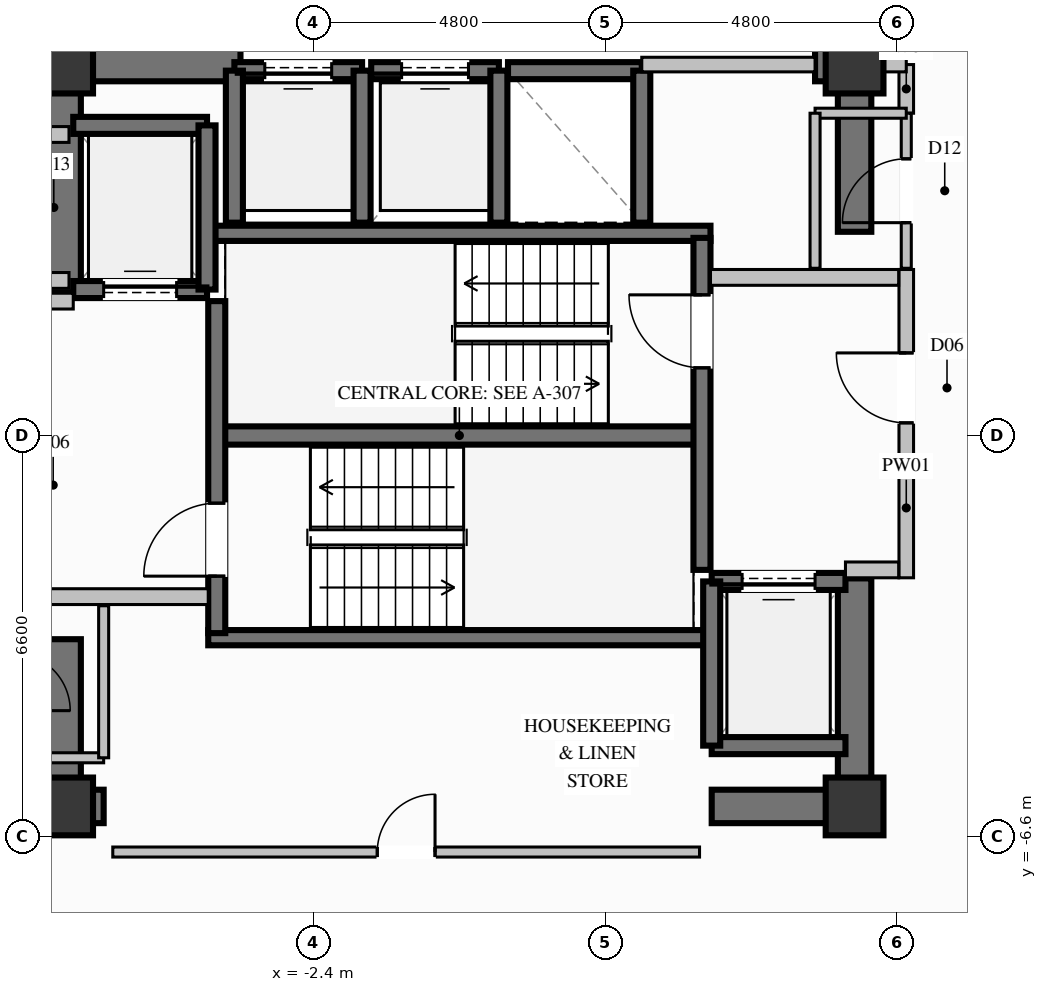
"""IFC4 building model, lengths in metres.
Left out: names, types, materials, properties, quantities, classifications, styles, units other than length and angle.
Written with IfcOpenShell. Run it as: python <this file> out.ifc"""

import sys

from ifc_helpers import new_model, si_unit, direction, frame, frame_2d, origin, origin_2d, place, context, subcontext, project, spatial, rectangle, extrude, element, fill, save


model = new_model("IFC4")
c1 = context("Model", 3, precision=1e-05, world=origin(), true_north=direction((0.0, 1.0)))
c2 = subcontext(c1, "Body", "Model", "MODEL_VIEW")
j1 = project(units=[si_unit("LENGTHUNIT", "METRE"), si_unit("PLANEANGLEUNIT", "RADIAN")], contexts=[c1])
p1 = place(None, origin())
s1 = spatial("IfcSite", under=j1, at=p1, CompositionType="ELEMENT")
p2 = place(p1, origin())
s2 = spatial("IfcBuilding", under=s1, at=p2, CompositionType="ELEMENT")
p3 = place(p2, frame((0.0, 0.0, 180.4)))
s3 = spatial("IfcBuildingStorey", under=s2, at=p3, CompositionType="ELEMENT", Elevation=180.4)
for number, where, z_axis, x_axis in (
    (1, (-6.5, -6.1, 0.0), (0.0, 0.0, 1.0), (1.0, 0.0, 0.0)),
    (2, (6.5, -6.1, 0.0), (0.0, 0.0, 1.0), (1.0, 0.0, 0.0)),
    (3, (6.5, 6.1, 0.0), (0.0, 0.0, 1.0), (1.0, 0.0, 0.0)),
    (4, (-6.5, 6.1, 0.0), (0.0, 0.0, 1.0), (1.0, 0.0, 0.0)),
):
    element("IfcColumn", number, at=place(p3, frame(where, z_axis=z_axis, x_axis=x_axis)), inside=s3, PredefinedType="COLUMN", context=c2, shape_type="SweptSolid", body=[
        extrude(rectangle(XDim=0.95, YDim=0.95, at=origin_2d()), origin(), (0.0, 0.0, 1.0), 3.6),
    ])
p4 = place(p3, frame((-3.99, 0.0, 0.0), z_axis=(0.0, 0.0, 1.0), x_axis=(1.0, 0.0, 0.0)))
e5 = element("IfcWall", 5, at=p4, inside=s3, PredefinedType="SHEAR", context=c2, shape_type="SweptSolid", body=[
    extrude(rectangle(XDim=7.98, YDim=0.3, at=frame_2d((3.99, 0.0))), origin(), (0.0, 0.0, 1.0), 3.6),
])
for number, where, z_axis, x_axis in (
    (6, (-4.13, -3.325, 0.0), (0.0, 0.0, 1.0), (1.0, 0.0, 0.0)),
    (7, (-4.13, 3.325, 0.0), (0.0, 0.0, 1.0), (1.0, 0.0, 0.0)),
):
    element("IfcWall", number, at=place(p3, frame(where, z_axis=z_axis, x_axis=x_axis)), inside=s3, PredefinedType="SOLIDWALL", context=c2, shape_type="SweptSolid", body=[
        extrude(rectangle(XDim=8.26, YDim=0.25, at=frame_2d((4.13, 0.0))), origin(), (0.0, 0.0, 1.0), 3.6),
    ])
p5 = place(p3, frame((-6.225, -6.1, 0.0), z_axis=(0.0, 0.0, 1.0), x_axis=(1.0, 0.0, 0.0)))
e8 = element("IfcWall", 8, at=p5, inside=s3, PredefinedType="SHEAR", context=c2, shape_type="SweptSolid", body=[
    extrude(rectangle(XDim=0.375, YDim=0.55, at=frame_2d((0.188, 0.0))), origin(), (0.0, 0.0, 1.0), 3.6),
])
p6 = place(p3, frame((4.15, -6.1, 0.0), z_axis=(0.0, 0.0, 1.0), x_axis=(1.0, 0.0, 0.0)))
e9 = element("IfcWall", 9, at=p6, inside=s3, PredefinedType="SHEAR", context=c2, shape_type="SweptSolid", body=[
    extrude(rectangle(XDim=2.075, YDim=0.55, at=frame_2d((1.038, 0.0))), origin(), (0.0, 0.0, 1.0), 3.6),
])
p7 = place(p3, frame((-6.225, 6.1, 0.0), z_axis=(0.0, 0.0, 1.0), x_axis=(1.0, 0.0, 0.0)))
e10 = element("IfcWall", 10, at=p7, inside=s3, PredefinedType="SHEAR", context=c2, shape_type="SweptSolid", body=[
    extrude(rectangle(XDim=2.625, YDim=0.55, at=frame_2d((1.312, 0.0))), origin(), (0.0, 0.0, 1.0), 3.6),
])
p8 = place(p3, frame((5.85, 6.1, 0.0), z_axis=(0.0, 0.0, 1.0), x_axis=(1.0, 0.0, 0.0)))
e11 = element("IfcWall", 11, at=p8, inside=s3, PredefinedType="SHEAR", context=c2, shape_type="SweptSolid", body=[
    extrude(rectangle(XDim=0.375, YDim=0.55, at=frame_2d((0.188, 0.0))), origin(), (0.0, 0.0, 1.0), 3.6),
])
p9 = place(p3, frame((-6.5, 2.35, 0.0), z_axis=(0.0, 0.0, 1.0), x_axis=(0.0, 1.0, 0.0)))
e12 = element("IfcWall", 12, at=p9, inside=s3, PredefinedType="SHEAR", context=c2, shape_type="SweptSolid", body=[
    extrude(rectangle(XDim=4.025, YDim=0.55, at=frame_2d((2.012, 0.0))), origin(), (0.0, 0.0, 1.0), 3.6),
])
p10 = place(p3, frame((-6.5, -6.375, 0.0), z_axis=(0.0, 0.0, 1.0), x_axis=(0.0, 1.0, 0.0)))
e13 = element("IfcWall", 13, at=p10, inside=s3, PredefinedType="SHEAR", context=c2, shape_type="SweptSolid", body=[
    extrude(rectangle(XDim=3.025, YDim=0.55, at=frame_2d((1.512, 0.0))), origin(), (0.0, 0.0, 1.0), 3.6),
])
p11 = place(p3, frame((6.5, -6.375, 0.0), z_axis=(0.0, 0.0, 1.0), x_axis=(0.0, 1.0, 0.0)))
e14 = element("IfcWall", 14, at=p11, inside=s3, PredefinedType="SHEAR", context=c2, shape_type="SweptSolid", body=[
    extrude(rectangle(XDim=4.025, YDim=0.55, at=frame_2d((2.012, 0.0))), origin(), (0.0, 0.0, 1.0), 3.6),
])
p12 = place(p3, frame((6.5, 3.35, 0.0), z_axis=(0.0, 0.0, 1.0), x_axis=(0.0, 1.0, 0.0)))
e15 = element("IfcWall", 15, at=p12, inside=s3, PredefinedType="SHEAR", context=c2, shape_type="SweptSolid", body=[
    extrude(rectangle(XDim=3.025, YDim=0.55, at=frame_2d((1.512, 0.0))), origin(), (0.0, 0.0, 1.0), 3.6),
])
p13 = place(p3, frame((-1.6, 6.0, 0.0), z_axis=(0.0, 0.0, 1.0), x_axis=(-1.0, 0.0, 0.0)))
e16 = element("IfcWall", 16, at=p13, inside=s3, PredefinedType="SOLIDWALL", context=c2, shape_type="SweptSolid", body=[
    extrude(rectangle(XDim=2.1, YDim=0.28, at=frame_2d((1.05, 0.0))), origin(), (0.0, 0.0, 1.0), 3.36),
])
p14 = place(p13, frame((0.5, 0.0, 0.0)))
e17 = element("IfcOpeningElement", 17, at=p14, cuts=e16, PredefinedType="OPENING", context=c2, shape_type="SweptSolid", body=[
    extrude(rectangle(XDim=1.1, YDim=2.2, at=frame_2d((0.55, 1.1))), frame((0.0, 0.15, 0.0), z_axis=(0.0, -1.0, 0.0), x_axis=(1.0, 0.0, 0.0)), (0.0, 0.0, 1.0), 0.3),
])
for number, where, z_axis, x_axis in (
    (18, (-3.7, 6.0, 0.0), (0.0, 0.0, 1.0), (0.0, -1.0, 0.0)),
    (19, (-1.6, 3.5, 0.0), (0.0, 0.0, 1.0), (0.0, 1.0, 0.0)),
):
    element("IfcWall", number, at=place(p3, frame(where, z_axis=z_axis, x_axis=x_axis)), inside=s3, PredefinedType="SOLIDWALL", context=c2, shape_type="SweptSolid", body=[
        extrude(rectangle(XDim=2.5, YDim=0.28, at=frame_2d((1.25, 0.0))), origin(), (0.0, 0.0, 1.0), 3.36),
    ])
p15 = place(p3, frame((0.65, 6.0, 0.0), z_axis=(0.0, 0.0, 1.0), x_axis=(-1.0, 0.0, 0.0)))
e20 = element("IfcWall", 20, at=p15, inside=s3, PredefinedType="SOLIDWALL", context=c2, shape_type="SweptSolid", body=[
    extrude(rectangle(XDim=2.1, YDim=0.28, at=frame_2d((1.05, 0.0))), origin(), (0.0, 0.0, 1.0), 3.36),
])
p16 = place(p15, frame((0.5, 0.0, 0.0)))
e21 = element("IfcOpeningElement", 21, at=p16, cuts=e20, PredefinedType="OPENING", context=c2, shape_type="SweptSolid", body=[
    extrude(rectangle(XDim=1.1, YDim=2.2, at=frame_2d((0.55, 1.1))), frame((0.0, 0.15, 0.0), z_axis=(0.0, -1.0, 0.0), x_axis=(1.0, 0.0, 0.0)), (0.0, 0.0, 1.0), 0.3),
])
p17 = place(p3, frame((0.65, 3.5, 0.0), z_axis=(0.0, 0.0, 1.0), x_axis=(0.0, 1.0, 0.0)))
e22 = element("IfcWall", 22, at=p17, inside=s3, PredefinedType="SOLIDWALL", context=c2, shape_type="SweptSolid", body=[
    extrude(rectangle(XDim=2.5, YDim=0.28, at=frame_2d((1.25, 0.0))), origin(), (0.0, 0.0, 1.0), 3.36),
])
p18 = place(p3, frame((3.0, 6.0, 0.0), z_axis=(0.0, 0.0, 1.0), x_axis=(-1.0, 0.0, 0.0)))
e23 = element("IfcWall", 23, at=p18, inside=s3, PredefinedType="SOLIDWALL", context=c2, shape_type="SweptSolid", body=[
    extrude(rectangle(XDim=2.2, YDim=0.28, at=frame_2d((1.1, 0.0))), origin(), (0.0, 0.0, 1.0), 3.36),
])
p19 = place(p3, frame((3.0, 3.5, 0.0), z_axis=(0.0, 0.0, 1.0), x_axis=(0.0, 1.0, 0.0)))
e24 = element("IfcWall", 24, at=p19, inside=s3, PredefinedType="SOLIDWALL", context=c2, shape_type="SweptSolid", body=[
    extrude(rectangle(XDim=2.5, YDim=0.28, at=frame_2d((1.25, 0.0))), origin(), (0.0, 0.0, 1.0), 3.36),
])
p20 = place(p3, frame((-6.35, 2.4, 0.0), z_axis=(0.0, 0.0, 1.0), x_axis=(1.0, 0.0, 0.0)))
e25 = element("IfcWall", 25, at=p20, inside=s3, PredefinedType="SOLIDWALL", context=c2, shape_type="SweptSolid", body=[
    extrude(rectangle(XDim=2.2, YDim=0.28, at=frame_2d((1.1, 0.0))), origin(), (0.0, 0.0, 1.0), 3.36),
])
p21 = place(p20, frame((0.5, 0.0, 0.0)))
e26 = element("IfcOpeningElement", 26, at=p21, cuts=e25, PredefinedType="OPENING", context=c2, shape_type="SweptSolid", body=[
    extrude(rectangle(XDim=1.2, YDim=2.2, at=frame_2d((0.6, 1.1))), frame((0.0, 0.15, 0.0), z_axis=(0.0, -1.0, 0.0), x_axis=(1.0, 0.0, 0.0)), (0.0, 0.0, 1.0), 0.3),
])
p22 = place(p3, frame((-4.15, 5.1, 0.0), z_axis=(0.0, 0.0, 1.0), x_axis=(-1.0, 0.0, 0.0)))
e27 = element("IfcWall", 27, at=p22, inside=s3, PredefinedType="SOLIDWALL", context=c2, shape_type="SweptSolid", body=[
    extrude(rectangle(XDim=2.2, YDim=0.28, at=frame_2d((1.1, 0.0))), origin(), (0.0, 0.0, 1.0), 3.36),
])
p23 = place(p3, frame((-4.15, 2.4, 0.0), z_axis=(0.0, 0.0, 1.0), x_axis=(0.0, 1.0, 0.0)))
e28 = element("IfcWall", 28, at=p23, inside=s3, PredefinedType="SOLIDWALL", context=c2, shape_type="SweptSolid", body=[
    extrude(rectangle(XDim=2.7, YDim=0.28, at=frame_2d((1.35, 0.0))), origin(), (0.0, 0.0, 1.0), 3.36),
])
p24 = place(p3, frame((4.15, -5.1, 0.0), z_axis=(0.0, 0.0, 1.0), x_axis=(1.0, 0.0, 0.0)))
e29 = element("IfcWall", 29, at=p24, inside=s3, PredefinedType="SOLIDWALL", context=c2, shape_type="SweptSolid", body=[
    extrude(rectangle(XDim=2.2, YDim=0.28, at=frame_2d((1.1, 0.0))), origin(), (0.0, 0.0, 1.0), 3.36),
])
p25 = place(p3, frame((6.35, -2.4, 0.0), z_axis=(0.0, 0.0, 1.0), x_axis=(-1.0, 0.0, 0.0)))
e30 = element("IfcWall", 30, at=p25, inside=s3, PredefinedType="SOLIDWALL", context=c2, shape_type="SweptSolid", body=[
    extrude(rectangle(XDim=2.2, YDim=0.28, at=frame_2d((1.1, 0.0))), origin(), (0.0, 0.0, 1.0), 3.36),
])
p26 = place(p25, frame((0.5, 0.0, 0.0)))
e31 = element("IfcOpeningElement", 31, at=p26, cuts=e30, PredefinedType="OPENING", context=c2, shape_type="SweptSolid", body=[
    extrude(rectangle(XDim=1.2, YDim=2.2, at=frame_2d((0.6, 1.1))), frame((0.0, 0.15, 0.0), z_axis=(0.0, -1.0, 0.0), x_axis=(1.0, 0.0, 0.0)), (0.0, 0.0, 1.0), 0.3),
])
p27 = place(p3, frame((4.15, -2.4, 0.0), z_axis=(0.0, 0.0, 1.0), x_axis=(0.0, -1.0, 0.0)))
e32 = element("IfcWall", 32, at=p27, inside=s3, PredefinedType="SOLIDWALL", context=c2, shape_type="SweptSolid", body=[
    extrude(rectangle(XDim=2.7, YDim=0.28, at=frame_2d((1.35, 0.0))), origin(), (0.0, 0.0, 1.0), 3.36),
])
p28 = place(p3, frame((-3.99, -3.25, 0.0), z_axis=(0.0, 0.0, 1.0), x_axis=(0.0, 1.0, 0.0)))
e33 = element("IfcWall", 33, at=p28, inside=s3, PredefinedType="SOLIDWALL", context=c2, shape_type="SweptSolid", body=[
    extrude(rectangle(XDim=5.46, YDim=0.28, at=frame_2d((2.73, 0.0))), origin(), (0.0, 0.0, 1.0), 3.36),
])
p29 = place(p28, frame((0.937, 0.0, 0.0)))
e34 = element("IfcOpeningElement", 34, at=p29, cuts=e33, PredefinedType="OPENING", context=c2, shape_type="SweptSolid", body=[
    extrude(rectangle(XDim=1.2, YDim=2.2, at=frame_2d((0.6, 1.1))), frame((0.0, 0.15, 0.0), z_axis=(0.0, -1.0, 0.0), x_axis=(1.0, 0.0, 0.0)), (0.0, 0.0, 1.0), 0.3),
])
p30 = place(p3, frame((3.99, -2.21, 0.0), z_axis=(0.0, 0.0, 1.0), x_axis=(0.0, 1.0, 0.0)))
e35 = element("IfcWall", 35, at=p30, inside=s3, PredefinedType="SOLIDWALL", context=c2, shape_type="SweptSolid", body=[
    extrude(rectangle(XDim=5.46, YDim=0.28, at=frame_2d((2.73, 0.0))), origin(), (0.0, 0.0, 1.0), 3.36),
])
p31 = place(p30, frame((3.323, 0.0, 0.0)))
e36 = element("IfcOpeningElement", 36, at=p31, cuts=e35, PredefinedType="OPENING", context=c2, shape_type="SweptSolid", body=[
    extrude(rectangle(XDim=1.2, YDim=2.2, at=frame_2d((0.6, 1.1))), frame((0.0, 0.15, 0.0), z_axis=(0.0, -1.0, 0.0), x_axis=(1.0, 0.0, 0.0)), (0.0, 0.0, 1.0), 0.3),
])
p32 = place(p3, frame((-7.225, -2.65, 0.0), z_axis=(0.0, 0.0, 1.0), x_axis=(1.0, 0.0, 0.0)))
e37 = element("IfcWall", 37, at=p32, inside=s3, PredefinedType="PARTITIONING", context=c2, shape_type="SweptSolid", body=[
    extrude(rectangle(XDim=3.095, YDim=0.26, at=frame_2d((1.548, 0.0))), origin(), (0.0, 0.0, 1.0), 3.36),
])
p33 = place(p3, frame((-7.225, 2.21, 0.0), z_axis=(0.0, 0.0, 1.0), x_axis=(1.0, 0.0, 0.0)))
e38 = element("IfcWall", 38, at=p33, inside=s3, PredefinedType="PARTITIONING", context=c2, shape_type="SweptSolid", body=[
    extrude(rectangle(XDim=0.875, YDim=0.26, at=frame_2d((0.438, 0.0))), origin(), (0.0, 0.0, 1.0), 3.36),
])
p34 = place(p3, frame((7.35, -2.34, 0.0), z_axis=(0.0, 0.0, 1.0), x_axis=(0.0, 1.0, 0.0)))
e39 = element("IfcWall", 39, at=p34, inside=s3, PredefinedType="PARTITIONING", context=c2, shape_type="SweptSolid", body=[
    extrude(rectangle(XDim=5.07, YDim=0.24, at=frame_2d((2.535, 0.0))), origin(), (0.0, 0.0, 1.0), 2.445),
])
p35 = place(p34, frame((2.548, 0.0, 0.0)))
e40 = element("IfcOpeningElement", 40, at=p35, cuts=e39, PredefinedType="OPENING", context=c2, shape_type="SweptSolid", body=[
    extrude(rectangle(XDim=1.15, YDim=2.2, at=frame_2d((0.575, 1.1))), frame((0.0, 0.13, 0.0), z_axis=(0.0, -1.0, 0.0), x_axis=(1.0, 0.0, 0.0)), (0.0, 0.0, 1.0), 0.26),
])
p36 = place(p3, frame((6.35, -2.21, 0.0), z_axis=(0.0, 0.0, 1.0), x_axis=(1.0, 0.0, 0.0)))
e41 = element("IfcWall", 41, at=p36, inside=s3, PredefinedType="PARTITIONING", context=c2, shape_type="SweptSolid", body=[
    extrude(rectangle(XDim=0.875, YDim=0.26, at=frame_2d((0.438, 0.0))), origin(), (0.0, 0.0, 1.0), 3.36),
])
p37 = place(p3, frame((4.13, 2.6, 0.0), z_axis=(0.0, 0.0, 1.0), x_axis=(1.0, 0.0, 0.0)))
e42 = element("IfcWall", 42, at=p37, inside=s3, PredefinedType="PARTITIONING", context=c2, shape_type="SweptSolid", body=[
    extrude(rectangle(XDim=3.095, YDim=0.26, at=frame_2d((1.548, 0.0))), origin(), (0.0, 0.0, 1.0), 3.36),
])
for number, where, z_axis, x_axis in (
    (43, (-7.35, 4.95, 0.0), (0.0, 0.0, 1.0), (1.0, 0.0, 0.0)),
    (44, (-7.35, 2.55, 0.0), (0.0, 0.0, 1.0), (1.0, 0.0, 0.0)),
):
    element("IfcWall", number, at=place(p3, frame(where, z_axis=z_axis, x_axis=x_axis)), inside=s3, PredefinedType="PARTITIONING", context=c2, shape_type="SweptSolid", body=[
        extrude(rectangle(XDim=0.93, YDim=0.26, at=frame_2d((0.465, 0.0))), origin(), (0.0, 0.0, 1.0), 3.36),
    ])
p38 = place(p3, frame((3.0, 6.1, 0.0), z_axis=(0.0, 0.0, 1.0), x_axis=(1.0, 0.0, 0.0)))
e45 = element("IfcWall", 45, at=p38, inside=s3, PredefinedType="PARTITIONING", context=c2, shape_type="SweptSolid", body=[
    extrude(rectangle(XDim=2.85, YDim=0.24, at=frame_2d((1.425, 0.0))), origin(), (0.0, 0.0, 1.0), 2.445),
])
p39 = place(p3, frame((7.35, 5.3, 0.0), z_axis=(0.0, 0.0, 1.0), x_axis=(0.0, 1.0, 0.0)))
e46 = element("IfcWall", 46, at=p39, inside=s3, PredefinedType="PARTITIONING", context=c2, shape_type="SweptSolid", body=[
    extrude(rectangle(XDim=0.8, YDim=0.24, at=frame_2d((0.4, 0.0))), origin(), (0.0, 0.0, 1.0), 2.445),
])
for number, where, z_axis, x_axis in (
    (47, (6.5, 6.1, 0.0), (0.0, 0.0, 1.0), (1.0, 0.0, 0.0)),
    (48, (-7.35, 6.1, 0.0), (0.0, 0.0, 1.0), (1.0, 0.0, 0.0)),
):
    element("IfcWall", number, at=place(p3, frame(where, z_axis=z_axis, x_axis=x_axis)), inside=s3, PredefinedType="PARTITIONING", context=c2, shape_type="SweptSolid", body=[
        extrude(rectangle(XDim=0.85, YDim=0.24, at=frame_2d((0.425, 0.0))), origin(), (0.0, 0.0, 1.0), 2.801),
    ])
p40 = place(p3, frame((-7.35, -5.3, 0.0), z_axis=(0.0, 0.0, 1.0), x_axis=(1.0, 0.0, 0.0)))
e49 = element("IfcWall", 49, at=p40, inside=s3, PredefinedType="PARTITIONING", context=c2, shape_type="SweptSolid", body=[
    extrude(rectangle(XDim=1.5, YDim=0.165, at=frame_2d((0.75, 0.0))), origin(), (0.0, 0.0, 1.0), 2.445),
])
p41 = place(p3, frame((-5.85, -5.3, 0.0), z_axis=(0.0, 0.0, 1.0), x_axis=(0.0, 1.0, 0.0)))
e50 = element("IfcWall", 50, at=p41, inside=s3, PredefinedType="PARTITIONING", context=c2, shape_type="SweptSolid", body=[
    extrude(rectangle(XDim=2.5, YDim=0.165, at=frame_2d((1.25, 0.0))), origin(), (0.0, 0.0, 1.0), 2.445),
])
p42 = place(p3, frame((7.35, 2.75, 0.0), z_axis=(0.0, 0.0, 1.0), x_axis=(0.0, 1.0, 0.0)))
e51 = element("IfcWall", 51, at=p42, inside=s3, PredefinedType="PARTITIONING", context=c2, shape_type="SweptSolid", body=[
    extrude(rectangle(XDim=2.55, YDim=0.165, at=frame_2d((1.275, 0.0))), origin(), (0.0, 0.0, 1.0), 3.36),
])
p43 = place(p42, frame((0.75, 0.0, 0.0)))
e52 = element("IfcOpeningElement", 52, at=p43, cuts=e51, PredefinedType="OPENING", context=c2, shape_type="SweptSolid", body=[
    extrude(rectangle(XDim=1.05, YDim=2.15, at=frame_2d((0.525, 1.075))), frame((0.0, 0.093, 0.0), z_axis=(0.0, -1.0, 0.0), x_axis=(1.0, 0.0, 0.0)), (0.0, 0.0, 1.0), 0.185),
])
p44 = place(p3, frame((7.35, 5.3, 0.0), z_axis=(0.0, 0.0, 1.0), x_axis=(-1.0, 0.0, 0.0)))
e53 = element("IfcWall", 53, at=p44, inside=s3, PredefinedType="PARTITIONING", context=c2, shape_type="SweptSolid", body=[
    extrude(rectangle(XDim=1.5, YDim=0.165, at=frame_2d((0.75, 0.0))), origin(), (0.0, 0.0, 1.0), 2.445),
])
p45 = place(p3, frame((5.85, 5.3, 0.0), z_axis=(0.0, 0.0, 1.0), x_axis=(0.0, -1.0, 0.0)))
e54 = element("IfcWall", 54, at=p45, inside=s3, PredefinedType="PARTITIONING", context=c2, shape_type="SweptSolid", body=[
    extrude(rectangle(XDim=2.55, YDim=0.165, at=frame_2d((1.275, 0.0))), origin(), (0.0, 0.0, 1.0), 2.445),
])
p46 = place(p3, frame((-5.7, -6.85, 0.0), z_axis=(0.0, 0.0, 1.0), x_axis=(1.0, 0.0, 0.0)))
e55 = element("IfcWall", 55, at=p46, inside=s3, PredefinedType="PARTITIONING", context=c2, shape_type="SweptSolid", body=[
    extrude(rectangle(XDim=9.65, YDim=0.165, at=frame_2d((4.825, 0.0))), origin(), (0.0, 0.0, 1.0), 2.445),
])
p47 = place(p46, frame((4.35, 0.0, 0.0)))
e56 = element("IfcOpeningElement", 56, at=p47, cuts=e55, PredefinedType="OPENING", context=c2, shape_type="SweptSolid", body=[
    extrude(rectangle(XDim=0.95, YDim=2.1, at=frame_2d((0.475, 1.05))), frame((0.0, 0.093, 0.0), z_axis=(0.0, -1.0, 0.0), x_axis=(1.0, 0.0, 0.0)), (0.0, 0.0, 1.0), 0.185),
])
p48 = place(p3, frame((7.35, 8.65, 0.0), z_axis=(0.0, 0.0, 1.0), x_axis=(0.846409267484, -0.532532958526, 0.0)))
e57 = element("IfcWall", 57, at=p48, inside=s3, PredefinedType="PARTITIONING", context=c2, shape_type="SweptSolid", body=[
    extrude(rectangle(XDim=4.413, YDim=0.24, at=frame_2d((2.206, 0.0))), origin(), (0.0, 0.0, 1.0), 3.36),
])
p49 = place(p48, frame((1.706, 0.0, 0.0)))
e58 = element("IfcOpeningElement", 58, at=p49, cuts=e57, PredefinedType="OPENING", context=c2, shape_type="SweptSolid", body=[
    extrude(rectangle(XDim=1.0, YDim=2.2, at=frame_2d((0.5, 1.1))), frame((0.0, 0.13, 0.0), z_axis=(0.0, -1.0, 0.0), x_axis=(1.0, 0.0, 0.0)), (0.0, 0.0, 1.0), 0.26),
])
p50 = place(p14, origin())
e59 = element("IfcDoor", 59, at=p50, inside=s3, OperationType="SLIDING_TO_LEFT", PredefinedType="DOOR", context=c2, shape_type="SweptSolid", body=[
    extrude(rectangle(XDim=1.1, YDim=2.2, at=frame_2d((0.55, 1.1))), frame((0.0, 0.025, 0.0), z_axis=(0.0, -1.0, 0.0), x_axis=(1.0, 0.0, 0.0)), (0.0, 0.0, 1.0), 0.05),
])
fill(e17, e59)
p51 = place(p16, origin())
e60 = element("IfcDoor", 60, at=p51, inside=s3, OperationType="SLIDING_TO_LEFT", PredefinedType="DOOR", context=c2, shape_type="SweptSolid", body=[
    extrude(rectangle(XDim=1.1, YDim=2.2, at=frame_2d((0.55, 1.1))), frame((0.0, 0.025, 0.0), z_axis=(0.0, -1.0, 0.0), x_axis=(1.0, 0.0, 0.0)), (0.0, 0.0, 1.0), 0.05),
])
fill(e21, e60)
p52 = place(p21, origin())
e61 = element("IfcDoor", 61, at=p52, inside=s3, OperationType="SLIDING_TO_LEFT", PredefinedType="DOOR", context=c2, shape_type="SweptSolid", body=[
    extrude(rectangle(XDim=1.2, YDim=2.2, at=frame_2d((0.6, 1.1))), frame((0.0, 0.025, 0.0), z_axis=(0.0, -1.0, 0.0), x_axis=(1.0, 0.0, 0.0)), (0.0, 0.0, 1.0), 0.05),
])
fill(e26, e61)
p53 = place(p26, origin())
e62 = element("IfcDoor", 62, at=p53, inside=s3, OperationType="SLIDING_TO_LEFT", PredefinedType="DOOR", context=c2, shape_type="SweptSolid", body=[
    extrude(rectangle(XDim=1.2, YDim=2.2, at=frame_2d((0.6, 1.1))), frame((0.0, 0.025, 0.0), z_axis=(0.0, -1.0, 0.0), x_axis=(1.0, 0.0, 0.0)), (0.0, 0.0, 1.0), 0.05),
])
fill(e31, e62)
p54 = place(p29, origin())
e63 = element("IfcDoor", 63, at=p54, inside=s3, OperationType="SINGLE_SWING_LEFT", PredefinedType="DOOR", context=c2, shape_type="SweptSolid", body=[
    extrude(rectangle(XDim=1.2, YDim=2.2, at=frame_2d((0.6, 1.1))), frame((0.0, 0.025, 0.0), z_axis=(0.0, -1.0, 0.0), x_axis=(1.0, 0.0, 0.0)), (0.0, 0.0, 1.0), 0.05),
])
fill(e34, e63)
p55 = place(p31, origin())
e64 = element("IfcDoor", 64, at=p55, inside=s3, OperationType="SINGLE_SWING_RIGHT", PredefinedType="DOOR", context=c2, shape_type="SweptSolid", body=[
    extrude(rectangle(XDim=1.2, YDim=2.2, at=frame_2d((0.6, 1.1))), frame((0.0, 0.025, 0.0), z_axis=(0.0, -1.0, 0.0), x_axis=(1.0, 0.0, 0.0)), (0.0, 0.0, 1.0), 0.05),
])
fill(e36, e64)
p56 = place(p35, origin())
e65 = element("IfcDoor", 65, at=p56, inside=s3, OperationType="SINGLE_SWING_RIGHT", PredefinedType="DOOR", context=c2, shape_type="SweptSolid", body=[
    extrude(rectangle(XDim=1.15, YDim=2.2, at=frame_2d((0.575, 1.1))), frame((0.0, 0.025, 0.0), z_axis=(0.0, -1.0, 0.0), x_axis=(1.0, 0.0, 0.0)), (0.0, 0.0, 1.0), 0.05),
])
fill(e40, e65)
p57 = place(p43, origin())
e66 = element("IfcDoor", 66, at=p57, inside=s3, OperationType="SINGLE_SWING_LEFT", PredefinedType="DOOR", context=c2, shape_type="SweptSolid", body=[
    extrude(rectangle(XDim=1.05, YDim=2.15, at=frame_2d((0.525, 1.075))), frame((0.0, 0.025, 0.0), z_axis=(0.0, -1.0, 0.0), x_axis=(1.0, 0.0, 0.0)), (0.0, 0.0, 1.0), 0.05),
])
fill(e52, e66)
p58 = place(p47, origin())
e67 = element("IfcDoor", 67, at=p58, inside=s3, OperationType="SINGLE_SWING_RIGHT", PredefinedType="DOOR", context=c2, shape_type="SweptSolid", body=[
    extrude(rectangle(XDim=0.95, YDim=2.1, at=frame_2d((0.475, 1.05))), frame((0.0, 0.025, 0.0), z_axis=(0.0, -1.0, 0.0), x_axis=(1.0, 0.0, 0.0)), (0.0, 0.0, 1.0), 0.05),
])
fill(e56, e67)
save(model, sys.argv[1])
